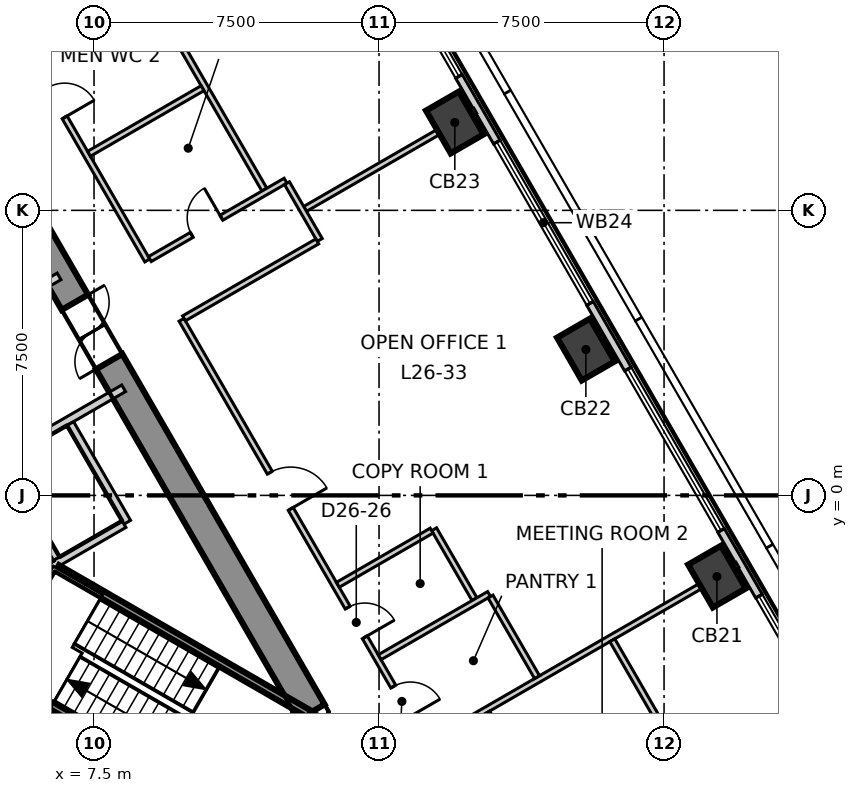
"""IFC4 building model, lengths in metres.
Left out: names, types, materials, properties, quantities, classifications, styles, units other than length and angle.
Written with IfcOpenShell. Run it as: python <this file> out.ifc"""

import sys

from ifc_helpers import new_model, si_unit, direction, frame, frame_2d, origin, origin_2d, place, context, subcontext, project, spatial, polyline, rectangle, outline, extrude, element, fill, save


model = new_model("IFC4")
c1 = context("Model", 3, precision=1e-05, world=origin(), true_north=direction((0.0, 1.0)))
c2 = subcontext(c1, "Body", "Model", "MODEL_VIEW")
j1 = project(units=[si_unit("LENGTHUNIT", "METRE"), si_unit("PLANEANGLEUNIT", "RADIAN")], contexts=[c1])
p1 = place(None, origin())
s1 = spatial("IfcSite", under=j1, at=p1, CompositionType="ELEMENT")
p2 = place(p1, origin())
s2 = spatial("IfcBuilding", under=s1, at=p2, CompositionType="ELEMENT")
p3 = place(p2, frame((0.0, 0.0, 116.3)))
s3 = spatial("IfcBuildingStorey", under=s2, at=p3, CompositionType="ELEMENT", Elevation=116.3)
p4 = place(p3, frame((11.547, -8.6, -0.3), z_axis=(0.0, 0.0, 1.0), x_axis=(0.49987182685, 0.866099391942, 0.0)))
e1 = element("IfcWall", 1, at=p4, inside=s3, PredefinedType="SHEAR", context=c2, shape_type="SweptSolid", body=[
    extrude(outline(polyline([(-0.231, -0.4), (1.674, -0.4), (3.579, -0.4), (3.118, 0.4), (1.674, 0.4), (0.231, 0.4), (-0.231, -0.4)])), origin(), (0.0, 0.0, 1.0), 4.0),
])
p5 = place(p4, frame((0.974, 0.0, 0.3)))
e2 = element("IfcOpeningElement", 2, at=p5, cuts=e1, PredefinedType="OPENING", context=c2, shape_type="SweptSolid", body=[
    extrude(rectangle(XDim=1.4, YDim=2.1, at=frame_2d((0.7, 1.05))), frame((0.0, 0.41, 0.0), z_axis=(0.0, -1.0, 0.0), x_axis=(1.0, 0.0, 0.0)), (0.0, 0.0, 1.0), 0.82),
])
p6 = place(p3, frame((13.221, -5.7, -0.3), z_axis=(0.0, 0.0, 1.0), x_axis=(-0.499995765644, 0.866027848477, 0.0)))
e3 = element("IfcWall", 3, at=p6, inside=s3, PredefinedType="SHEAR", context=c2, shape_type="SweptSolid", body=[
    extrude(outline(polyline([(-0.231, -0.4), (1.732, -0.4), (3.695, -0.4), (5.658, -0.4), (7.621, -0.4), (9.584, -0.4), (11.547, -0.4), (13.51, -0.4), (15.473, -0.4), (17.436, -0.4), (19.399, -0.4), (21.362, -0.4), (23.325, -0.4), (22.863, 0.4), (20.977, 0.4), (19.091, 0.4), (17.205, 0.4), (15.319, 0.4), (13.433, 0.4), (11.547, 0.4), (9.661, 0.4), (7.775, 0.4), (5.889, 0.4), (4.003, 0.4), (2.117, 0.4), (0.231, 0.4), (-0.231, -0.4)])), origin(), (0.0, 0.0, 1.0), 4.0),
])
p7 = place(p6, frame((10.647, 0.0, 0.3)))
e4 = element("IfcOpeningElement", 4, at=p7, cuts=e3, PredefinedType="OPENING", context=c2, shape_type="SweptSolid", body=[
    extrude(rectangle(XDim=1.8, YDim=2.1, at=frame_2d((0.9, 1.05))), frame((0.0, 0.41, 0.0), z_axis=(0.0, -1.0, 0.0), x_axis=(1.0, 0.0, 0.0)), (0.0, 0.0, 1.0), 0.82),
])
for number, where, z_axis, x_axis in (
    (5, (23.892, -2.136, -0.3), (0.0, 0.0, 1.0), (-0.5, 0.866, 0.0)),
    (6, (20.443, 3.838, -0.3), (0.0, 0.0, 1.0), (-0.5, 0.866, 0.0)),
    (7, (16.994, 9.812, -0.3), (0.0, 0.0, 1.0), (-0.5, 0.866, 0.0)),
):
    element("IfcColumn", number, at=place(p3, frame(where, z_axis=z_axis, x_axis=x_axis)), inside=s3, PredefinedType="COLUMN", context=c2, shape_type="SweptSolid", body=[
        extrude(rectangle(XDim=1.3, YDim=1.0, at=origin_2d()), origin(), (0.0, 0.0, 1.0), 4.0),
    ])
p8 = place(p3, frame((32.048, -14.861, 0.0), z_axis=(0.0, 0.0, 1.0), x_axis=(-0.499996704161, 0.866027306629, 0.0)))
e8 = element("IfcWall", 8, at=p8, inside=s3, PredefinedType="ELEMENTEDWALL", context=c2, shape_type="SweptSolid", body=[
    extrude(rectangle(XDim=57.769, YDim=0.2, at=frame_2d((28.884, 0.0))), origin(), (0.0, 0.0, 1.0), 3.7),
])
p9 = place(p8, frame((2.302, 0.0, 0.9)))
e9 = element("IfcOpeningElement", 9, at=p9, cuts=e8, PredefinedType="OPENING", context=c2, shape_type="SweptSolid", body=[
    extrude(rectangle(XDim=4.9, YDim=2.5, at=frame_2d((2.45, 1.25))), frame((0.0, 0.11, 0.0), z_axis=(0.0, -1.0, 0.0), x_axis=(1.0, 0.0, 0.0)), (0.0, 0.0, 1.0), 0.22),
])
p10 = place(p8, frame((9.199, 0.0, 0.9)))
e10 = element("IfcOpeningElement", 10, at=p10, cuts=e8, PredefinedType="OPENING", context=c2, shape_type="SweptSolid", body=[
    extrude(rectangle(XDim=4.9, YDim=2.5, at=frame_2d((2.45, 1.25))), frame((0.0, 0.11, 0.0), z_axis=(0.0, -1.0, 0.0), x_axis=(1.0, 0.0, 0.0)), (0.0, 0.0, 1.0), 0.22),
])
p11 = place(p8, frame((16.097, 0.0, 0.9)))
e11 = element("IfcOpeningElement", 11, at=p11, cuts=e8, PredefinedType="OPENING", context=c2, shape_type="SweptSolid", body=[
    extrude(rectangle(XDim=4.9, YDim=2.5, at=frame_2d((2.45, 1.25))), frame((0.0, 0.11, 0.0), z_axis=(0.0, -1.0, 0.0), x_axis=(1.0, 0.0, 0.0)), (0.0, 0.0, 1.0), 0.22),
])
p12 = place(p8, frame((22.995, 0.0, 0.9)))
e12 = element("IfcOpeningElement", 12, at=p12, cuts=e8, PredefinedType="OPENING", context=c2, shape_type="SweptSolid", body=[
    extrude(rectangle(XDim=4.9, YDim=2.5, at=frame_2d((2.45, 1.25))), frame((0.0, 0.11, 0.0), z_axis=(0.0, -1.0, 0.0), x_axis=(1.0, 0.0, 0.0)), (0.0, 0.0, 1.0), 0.22),
])
p13 = place(p8, frame((29.893, 0.0, 0.9)))
e13 = element("IfcOpeningElement", 13, at=p13, cuts=e8, PredefinedType="OPENING", context=c2, shape_type="SweptSolid", body=[
    extrude(rectangle(XDim=4.9, YDim=2.5, at=frame_2d((2.45, 1.25))), frame((0.0, 0.11, 0.0), z_axis=(0.0, -1.0, 0.0), x_axis=(1.0, 0.0, 0.0)), (0.0, 0.0, 1.0), 0.22),
])
p14 = place(p8, frame((36.791, 0.0, 0.9)))
e14 = element("IfcOpeningElement", 14, at=p14, cuts=e8, PredefinedType="OPENING", context=c2, shape_type="SweptSolid", body=[
    extrude(rectangle(XDim=4.9, YDim=2.5, at=frame_2d((2.45, 1.25))), frame((0.0, 0.11, 0.0), z_axis=(0.0, -1.0, 0.0), x_axis=(1.0, 0.0, 0.0)), (0.0, 0.0, 1.0), 0.22),
])
p15 = place(p8, frame((43.689, 0.0, 0.9)))
e15 = element("IfcOpeningElement", 15, at=p15, cuts=e8, PredefinedType="OPENING", context=c2, shape_type="SweptSolid", body=[
    extrude(rectangle(XDim=4.9, YDim=2.5, at=frame_2d((2.45, 1.25))), frame((0.0, 0.11, 0.0), z_axis=(0.0, -1.0, 0.0), x_axis=(1.0, 0.0, 0.0)), (0.0, 0.0, 1.0), 0.22),
])
p16 = place(p8, frame((50.587, 0.0, 0.9)))
e16 = element("IfcOpeningElement", 16, at=p16, cuts=e8, PredefinedType="OPENING", context=c2, shape_type="SweptSolid", body=[
    extrude(rectangle(XDim=4.9, YDim=2.5, at=frame_2d((2.45, 1.25))), frame((0.0, 0.11, 0.0), z_axis=(0.0, -1.0, 0.0), x_axis=(1.0, 0.0, 0.0)), (0.0, 0.0, 1.0), 0.22),
])
p17 = place(p3, frame((13.055, 7.538, 0.0), z_axis=(0.0, 0.0, 1.0), x_axis=(0.866048717436, 0.499959617396, 0.0)))
e17 = element("IfcWall", 17, at=p17, inside=s3, PredefinedType="PARTITIONING", context=c2, shape_type="SweptSolid", body=[
    extrude(rectangle(XDim=5.168, YDim=0.15, at=frame_2d((2.584, 0.0))), origin(), (0.0, 0.0, 1.0), 3.2),
])
p18 = place(p3, frame((0.076, 21.468, 0.0), z_axis=(0.0, 0.0, 1.0), x_axis=(0.500006592492, -0.866021597574, 0.0)))
e18 = element("IfcWall", 18, at=p18, inside=s3, PredefinedType="PARTITIONING", context=c2, shape_type="SweptSolid", body=[
    extrude(rectangle(XDim=17.652, YDim=0.15, at=frame_2d((8.826, 0.0))), origin(), (0.0, 0.0, 1.0), 3.7),
])
p19 = place(p18, frame((6.303, 0.0, 0.0)))
e19 = element("IfcOpeningElement", 19, at=p19, cuts=e18, PredefinedType="OPENING", context=c2, shape_type="SweptSolid", body=[
    extrude(rectangle(XDim=1.1, YDim=2.1, at=frame_2d((0.55, 1.05))), frame((0.0, 0.085, 0.0), z_axis=(0.0, -1.0, 0.0), x_axis=(1.0, 0.0, 0.0)), (0.0, 0.0, 1.0), 0.17),
])
p20 = place(p18, frame((12.403, 0.0, 0.0)))
e20 = element("IfcOpeningElement", 20, at=p20, cuts=e18, PredefinedType="OPENING", context=c2, shape_type="SweptSolid", body=[
    extrude(rectangle(XDim=0.9, YDim=2.1, at=frame_2d((0.45, 1.05))), frame((0.0, 0.085, 0.0), z_axis=(0.0, -1.0, 0.0), x_axis=(1.0, 0.0, 0.0)), (0.0, 0.0, 1.0), 0.17),
])
p21 = place(p18, frame((9.503, 0.0, 0.0)))
e21 = element("IfcOpeningElement", 21, at=p21, cuts=e18, PredefinedType="OPENING", context=c2, shape_type="SweptSolid", body=[
    extrude(rectangle(XDim=1.0, YDim=2.1, at=frame_2d((0.5, 1.05))), frame((0.0, 0.085, 0.0), z_axis=(0.0, -1.0, 0.0), x_axis=(1.0, 0.0, 0.0)), (0.0, 0.0, 1.0), 0.17),
])
p22 = place(p18, frame((1.708, 0.0, 0.0)))
e22 = element("IfcOpeningElement", 22, at=p22, cuts=e18, PredefinedType="OPENING", context=c2, shape_type="SweptSolid", body=[
    extrude(rectangle(XDim=1.1, YDim=2.1, at=frame_2d((0.55, 1.05))), frame((0.0, 0.085, 0.0), z_axis=(0.0, -1.0, 0.0), x_axis=(1.0, 0.0, 0.0)), (0.0, 0.0, 1.0), 0.17),
])
p23 = place(p3, frame((9.803, 4.62, 0.0), z_axis=(0.0, 0.0, 1.0), x_axis=(0.500023004316, -0.866012121829, 0.0)))
e23 = element("IfcWall", 23, at=p23, inside=s3, PredefinedType="PARTITIONING", context=c2, shape_type="SweptSolid", body=[
    extrude(rectangle(XDim=17.719, YDim=0.15, at=frame_2d((8.86, 0.0))), origin(), (0.0, 0.0, 1.0), 3.7),
])
p24 = place(p23, frame((14.756, 0.0, 0.0)))
e24 = element("IfcOpeningElement", 24, at=p24, cuts=e23, PredefinedType="OPENING", context=c2, shape_type="SweptSolid", body=[
    extrude(rectangle(XDim=1.1, YDim=2.1, at=frame_2d((0.55, 1.05))), frame((0.0, 0.085, 0.0), z_axis=(0.0, -1.0, 0.0), x_axis=(1.0, 0.0, 0.0)), (0.0, 0.0, 1.0), 0.17),
])
p25 = place(p23, frame((4.645, 0.0, 0.0)))
e25 = element("IfcOpeningElement", 25, at=p25, cuts=e23, PredefinedType="OPENING", context=c2, shape_type="SweptSolid", body=[
    extrude(rectangle(XDim=1.1, YDim=2.1, at=frame_2d((0.55, 1.05))), frame((0.0, 0.085, 0.0), z_axis=(0.0, -1.0, 0.0), x_axis=(1.0, 0.0, 0.0)), (0.0, 0.0, 1.0), 0.17),
])
p26 = place(p23, frame((11.145, 0.0, 0.0)))
e26 = element("IfcOpeningElement", 26, at=p26, cuts=e23, PredefinedType="OPENING", context=c2, shape_type="SweptSolid", body=[
    extrude(rectangle(XDim=0.9, YDim=2.1, at=frame_2d((0.45, 1.05))), frame((0.0, 0.085, 0.0), z_axis=(0.0, -1.0, 0.0), x_axis=(1.0, 0.0, 0.0)), (0.0, 0.0, 1.0), 0.17),
])
p27 = place(p23, frame((8.745, 0.0, 0.0)))
e27 = element("IfcOpeningElement", 27, at=p27, cuts=e23, PredefinedType="OPENING", context=c2, shape_type="SweptSolid", body=[
    extrude(rectangle(XDim=0.9, YDim=2.1, at=frame_2d((0.45, 1.05))), frame((0.0, 0.085, 0.0), z_axis=(0.0, -1.0, 0.0), x_axis=(1.0, 0.0, 0.0)), (0.0, 0.0, 1.0), 0.17),
])
p28 = place(p3, frame((7.621, 15.601, 0.0), z_axis=(0.0, 0.0, 1.0), x_axis=(0.499937230245, -0.866061640887, 0.0)))
e28 = element("IfcWall", 28, at=p28, inside=s3, PredefinedType="PARTITIONING", context=c2, shape_type="SweptSolid", body=[
    extrude(rectangle(XDim=8.725, YDim=0.15, at=frame_2d((4.362, 0.0))), origin(), (0.0, 0.0, 1.0), 3.7),
])
p29 = place(p3, frame((7.368, 8.989, 0.0), z_axis=(0.0, 0.0, 1.0), x_axis=(0.866031223622, 0.49998991961, 0.0)))
e29 = element("IfcWall", 29, at=p29, inside=s3, PredefinedType="PARTITIONING", context=c2, shape_type="SweptSolid", body=[
    extrude(rectangle(XDim=3.45, YDim=0.15, at=frame_2d((1.725, 0.0))), origin(), (0.0, 0.0, 1.0), 3.7),
])
p30 = place(p3, frame((8.969, 6.218, 0.0), z_axis=(0.0, 0.0, 1.0), x_axis=(0.865997263264, 0.500048737644, 0.0)))
e30 = element("IfcWall", 30, at=p30, inside=s3, PredefinedType="PARTITIONING", context=c2, shape_type="SweptSolid", body=[
    extrude(rectangle(XDim=4.124, YDim=0.15, at=frame_2d((2.062, 0.0))), origin(), (0.0, 0.0, 1.0), 3.7),
])
p31 = place(p30, frame((1.274, 0.0, 0.0)))
e31 = element("IfcOpeningElement", 31, at=p31, cuts=e30, PredefinedType="OPENING", context=c2, shape_type="SweptSolid", body=[
    extrude(rectangle(XDim=0.9, YDim=2.1, at=frame_2d((0.45, 1.05))), frame((0.0, 0.085, 0.0), z_axis=(0.0, -1.0, 0.0), x_axis=(1.0, 0.0, 0.0)), (0.0, 0.0, 1.0), 0.17),
])
p32 = place(p3, frame((12.578, 8.215, 0.0), z_axis=(0.0, 0.0, 1.0), x_axis=(0.499746958151, -0.866171448282, 0.0)))
e32 = element("IfcWall", 32, at=p32, inside=s3, PredefinedType="PARTITIONING", context=c2, shape_type="SweptSolid", body=[
    extrude(rectangle(XDim=1.725, YDim=0.15, at=frame_2d((0.863, 0.0))), origin(), (0.0, 0.0, 1.0), 3.7),
])
p33 = place(p3, frame((9.869, 4.659, 0.0), z_axis=(0.0, 0.0, 1.0), x_axis=(0.866033948129, 0.499985200469, 0.0)))
e33 = element("IfcWall", 33, at=p33, inside=s3, PredefinedType="PARTITIONING", context=c2, shape_type="SweptSolid", body=[
    extrude(rectangle(XDim=4.048, YDim=0.15, at=frame_2d((2.024, 0.0))), origin(), (0.0, 0.0, 1.0), 3.7),
])
p34 = place(p3, frame((16.449, -0.891, 0.0), z_axis=(0.0, 0.0, 1.0), x_axis=(0.500266112279, -0.865871709265, 0.0)))
e34 = element("IfcWall", 34, at=p34, inside=s3, PredefinedType="PARTITIONING", context=c2, shape_type="SweptSolid", body=[
    extrude(rectangle(XDim=2.125, YDim=0.15, at=frame_2d((1.062, 0.0))), origin(), (0.0, 0.0, 1.0), 3.7),
])
p35 = place(p3, frame((13.916, -2.353, 0.0), z_axis=(0.0, 0.0, 1.0), x_axis=(0.866004402611, 0.500036373335, 0.0)))
e35 = element("IfcWall", 35, at=p35, inside=s3, PredefinedType="PARTITIONING", context=c2, shape_type="SweptSolid", body=[
    extrude(rectangle(XDim=2.85, YDim=0.15, at=frame_2d((1.425, 0.0))), origin(), (0.0, 0.0, 1.0), 3.7),
])
p36 = place(p3, frame((15.016, -4.258, 0.0), z_axis=(0.0, 0.0, 1.0), x_axis=(0.866029041019, 0.499993700073, 0.0)))
e36 = element("IfcWall", 36, at=p36, inside=s3, PredefinedType="PARTITIONING", context=c2, shape_type="SweptSolid", body=[
    extrude(rectangle(XDim=3.324, YDim=0.15, at=frame_2d((1.662, 0.0))), origin(), (0.0, 0.0, 1.0), 3.7),
])
p37 = place(p3, frame((16.316, -6.51, 0.0), z_axis=(0.0, 0.0, 1.0), x_axis=(0.866024577697, 0.500001430823, 0.0)))
e37 = element("IfcWall", 37, at=p37, inside=s3, PredefinedType="PARTITIONING", context=c2, shape_type="SweptSolid", body=[
    extrude(rectangle(XDim=9.368, YDim=0.15, at=frame_2d((4.684, 0.0))), origin(), (0.0, 0.0, 1.0), 3.7),
])
p38 = place(p3, frame((17.933, -2.661, 0.0), z_axis=(0.0, 0.0, 1.0), x_axis=(0.499900713578, -0.866082719239, 0.0)))
e38 = element("IfcWall", 38, at=p38, inside=s3, PredefinedType="PARTITIONING", context=c2, shape_type="SweptSolid", body=[
    extrude(rectangle(XDim=2.45, YDim=0.15, at=frame_2d((1.225, 0.0))), origin(), (0.0, 0.0, 1.0), 3.7),
])
p39 = place(p3, frame((17.847, -5.712, 0.0), z_axis=(0.0, 0.0, 1.0), x_axis=(0.500069422629, -0.865985318901, 0.0)))
e39 = element("IfcWall", 39, at=p39, inside=s3, PredefinedType="PARTITIONING", context=c2, shape_type="SweptSolid", body=[
    extrude(rectangle(XDim=5.725, YDim=0.15, at=frame_2d((2.863, 0.0))), origin(), (0.0, 0.0, 1.0), 3.7),
])
p40 = place(p39, frame((1.276, 0.0, 0.0)))
e40 = element("IfcOpeningElement", 40, at=p40, cuts=e39, PredefinedType="OPENING", context=c2, shape_type="SweptSolid", body=[
    extrude(rectangle(XDim=0.9, YDim=2.1, at=frame_2d((0.45, 1.05))), frame((0.0, 0.085, 0.0), z_axis=(0.0, -1.0, 0.0), x_axis=(1.0, 0.0, 0.0)), (0.0, 0.0, 1.0), 0.17),
])
p41 = place(p3, frame((21.138, -3.812, 0.0), z_axis=(0.0, 0.0, 1.0), x_axis=(0.49998991961, -0.866031223622, 0.0)))
e41 = element("IfcWall", 41, at=p41, inside=s3, PredefinedType="PARTITIONING", context=c2, shape_type="SweptSolid", body=[
    extrude(rectangle(XDim=3.45, YDim=0.15, at=frame_2d((1.725, 0.0))), origin(), (0.0, 0.0, 1.0), 3.7),
])
p42 = place(p3, frame((1.577, 2.874, 0.0), z_axis=(0.0, 0.0, 1.0), x_axis=(0.866073694534, 0.499916348638, 0.0)))
e42 = element("IfcWall", 42, at=p42, inside=s3, PredefinedType="SOLIDWALL", context=c2, shape_type="SweptSolid", body=[
    extrude(rectangle(XDim=5.777, YDim=0.2, at=frame_2d((2.888, 0.0))), origin(), (0.0, 0.0, 1.0), 3.7),
])
p43 = place(p42, frame((2.497, 0.0, 0.0)))
e43 = element("IfcOpeningElement", 43, at=p43, cuts=e42, PredefinedType="OPENING", context=c2, shape_type="SweptSolid", body=[
    extrude(rectangle(XDim=1.1, YDim=2.1, at=frame_2d((0.55, 1.05))), frame((0.0, 0.11, 0.0), z_axis=(0.0, -1.0, 0.0), x_axis=(1.0, 0.0, 0.0)), (0.0, 0.0, 1.0), 0.22),
])
p44 = place(p3, frame((3.278, -0.071, 0.0), z_axis=(0.0, 0.0, 1.0), x_axis=(0.865929348003, 0.5001663366, 0.0)))
e44 = element("IfcWall", 44, at=p44, inside=s3, PredefinedType="SOLIDWALL", context=c2, shape_type="SweptSolid", body=[
    extrude(rectangle(XDim=5.776, YDim=0.2, at=frame_2d((2.888, 0.0))), origin(), (0.0, 0.0, 1.0), 3.7),
])
p45 = place(p3, frame((6.876, 1.891, 0.0), z_axis=(0.0, 0.0, 1.0), x_axis=(0.499990139034, -0.866031096941, 0.0)))
e45 = element("IfcWall", 45, at=p45, inside=s3, PredefinedType="SOLIDWALL", context=c2, shape_type="SweptSolid", body=[
    extrude(rectangle(XDim=3.0, YDim=0.2, at=frame_2d((1.5, 0.0))), origin(), (0.0, 0.0, 1.0), 3.7),
])
p46 = place(p3, frame((5.057, 0.841, 0.0), z_axis=(0.0, 0.0, 1.0), x_axis=(0.50012328804, -0.865954211699, 0.0)))
e46 = element("IfcWall", 46, at=p46, inside=s3, PredefinedType="SOLIDWALL", context=c2, shape_type="SweptSolid", body=[
    extrude(rectangle(XDim=2.9, YDim=0.2, at=frame_2d((1.45, 0.0))), origin(), (0.0, 0.0, 1.0), 3.7),
])
p47 = place(p3, frame((4.9, -2.714, 0.0), z_axis=(0.0, 0.0, 1.0), x_axis=(0.865992350556, 0.500057245502, 0.0)))
e47 = element("IfcWall", 47, at=p47, inside=s3, PredefinedType="SOLIDWALL", context=c2, shape_type="SweptSolid", body=[
    extrude(rectangle(XDim=3.914, YDim=0.2, at=frame_2d((1.957, 0.0))), origin(), (0.0, 0.0, 1.0), 3.7),
])
p48 = place(p3, frame((4.929, -4.693, 0.0), z_axis=(0.0, 0.0, 1.0), x_axis=(0.866005769735, -0.50003400563, 0.0)))
e48 = element("IfcWall", 48, at=p48, inside=s3, PredefinedType="SOLIDWALL", context=c2, shape_type="SweptSolid", body=[
    extrude(rectangle(XDim=7.665, YDim=0.2, at=frame_2d((3.833, 0.0))), origin(), (0.0, 0.0, 1.0), 3.7),
])
p49 = place(p3, frame((4.929, -4.462, 0.0), z_axis=(0.0, 0.0, 1.0), x_axis=(0.500200581029, 0.865909567298, 0.0)))
e49 = element("IfcWall", 49, at=p49, inside=s3, PredefinedType="SOLIDWALL", context=c2, shape_type="SweptSolid", body=[
    extrude(rectangle(XDim=2.799, YDim=0.2, at=frame_2d((1.399, 0.0))), origin(), (0.0, 0.0, 1.0), 3.7),
])
p50 = place(p3, frame((6.529, -1.922, 0.0), z_axis=(0.0, 0.0, 1.0), x_axis=(0.866060938598, -0.499938446846, 0.0)))
e50 = element("IfcWall", 50, at=p50, inside=s3, PredefinedType="SOLIDWALL", context=c2, shape_type="SweptSolid", body=[
    extrude(rectangle(XDim=7.665, YDim=0.2, at=frame_2d((3.832, 0.0))), origin(), (0.0, 0.0, 1.0), 3.7),
])
p51 = place(p10, origin())
e51 = element("IfcWindow", 51, at=p51, inside=s3, PartitioningType="SINGLE_PANEL", PredefinedType="WINDOW", context=c2, shape_type="SweptSolid", body=[
    extrude(rectangle(XDim=4.9, YDim=2.5, at=frame_2d((2.45, 1.25))), frame((0.0, 0.03, 0.0), z_axis=(0.0, -1.0, 0.0), x_axis=(1.0, 0.0, 0.0)), (0.0, 0.0, 1.0), 0.06),
])
fill(e10, e51)
p52 = place(p11, origin())
e52 = element("IfcWindow", 52, at=p52, inside=s3, PartitioningType="SINGLE_PANEL", PredefinedType="WINDOW", context=c2, shape_type="SweptSolid", body=[
    extrude(rectangle(XDim=4.9, YDim=2.5, at=frame_2d((2.45, 1.25))), frame((0.0, 0.03, 0.0), z_axis=(0.0, -1.0, 0.0), x_axis=(1.0, 0.0, 0.0)), (0.0, 0.0, 1.0), 0.06),
])
fill(e11, e52)
p53 = place(p12, origin())
e53 = element("IfcWindow", 53, at=p53, inside=s3, PartitioningType="SINGLE_PANEL", PredefinedType="WINDOW", context=c2, shape_type="SweptSolid", body=[
    extrude(rectangle(XDim=4.9, YDim=2.5, at=frame_2d((2.45, 1.25))), frame((0.0, 0.03, 0.0), z_axis=(0.0, -1.0, 0.0), x_axis=(1.0, 0.0, 0.0)), (0.0, 0.0, 1.0), 0.06),
])
fill(e12, e53)
p54 = place(p13, origin())
e54 = element("IfcWindow", 54, at=p54, inside=s3, PartitioningType="SINGLE_PANEL", PredefinedType="WINDOW", context=c2, shape_type="SweptSolid", body=[
    extrude(rectangle(XDim=4.9, YDim=2.5, at=frame_2d((2.45, 1.25))), frame((0.0, 0.03, 0.0), z_axis=(0.0, -1.0, 0.0), x_axis=(1.0, 0.0, 0.0)), (0.0, 0.0, 1.0), 0.06),
])
fill(e13, e54)
p55 = place(p25, origin())
e55 = element("IfcDoor", 55, at=p55, inside=s3, OperationType="SINGLE_SWING_LEFT", PredefinedType="DOOR", context=c2, shape_type="SweptSolid", body=[
    extrude(rectangle(XDim=1.1, YDim=2.1, at=frame_2d((0.55, 1.05))), frame((0.0, 0.025, 0.0), z_axis=(0.0, -1.0, 0.0), x_axis=(1.0, 0.0, 0.0)), (0.0, 0.0, 1.0), 0.05),
])
fill(e25, e55)
p56 = place(p26, origin())
e56 = element("IfcDoor", 56, at=p56, inside=s3, OperationType="SINGLE_SWING_LEFT", PredefinedType="DOOR", context=c2, shape_type="SweptSolid", body=[
    extrude(rectangle(XDim=0.9, YDim=2.1, at=frame_2d((0.45, 1.05))), frame((0.0, 0.025, 0.0), z_axis=(0.0, -1.0, 0.0), x_axis=(1.0, 0.0, 0.0)), (0.0, 0.0, 1.0), 0.05),
])
fill(e26, e56)
p57 = place(p27, origin())
e57 = element("IfcDoor", 57, at=p57, inside=s3, OperationType="SINGLE_SWING_LEFT", PredefinedType="DOOR", context=c2, shape_type="SweptSolid", body=[
    extrude(rectangle(XDim=0.9, YDim=2.1, at=frame_2d((0.45, 1.05))), frame((0.0, 0.025, 0.0), z_axis=(0.0, -1.0, 0.0), x_axis=(1.0, 0.0, 0.0)), (0.0, 0.0, 1.0), 0.05),
])
fill(e27, e57)
p58 = place(p31, origin())
e58 = element("IfcDoor", 58, at=p58, inside=s3, OperationType="SINGLE_SWING_LEFT", PredefinedType="DOOR", context=c2, shape_type="SweptSolid", body=[
    extrude(rectangle(XDim=0.9, YDim=2.1, at=frame_2d((0.45, 1.05))), frame((0.0, 0.025, 0.0), z_axis=(0.0, -1.0, 0.0), x_axis=(1.0, 0.0, 0.0)), (0.0, 0.0, 1.0), 0.05),
])
fill(e31, e58)
p59 = place(p20, origin())
e59 = element("IfcDoor", 59, at=p59, inside=s3, OperationType="SINGLE_SWING_LEFT", PredefinedType="DOOR", context=c2, shape_type="SweptSolid", body=[
    extrude(rectangle(XDim=0.9, YDim=2.1, at=frame_2d((0.45, 1.05))), frame((0.0, 0.025, 0.0), z_axis=(0.0, -1.0, 0.0), x_axis=(1.0, 0.0, 0.0)), (0.0, 0.0, 1.0), 0.05),
])
fill(e20, e59)
p60 = place(p7, origin())
e60 = element("IfcDoor", 60, at=p60, inside=s3, OperationType="DOUBLE_DOOR_SINGLE_SWING", PredefinedType="DOOR", context=c2, shape_type="SweptSolid", body=[
    extrude(rectangle(XDim=1.8, YDim=2.1, at=frame_2d((0.9, 1.05))), frame((0.0, 0.025, 0.0), z_axis=(0.0, -1.0, 0.0), x_axis=(1.0, 0.0, 0.0)), (0.0, 0.0, 1.0), 0.05),
])
fill(e4, e60)
save(model, sys.argv[1])
